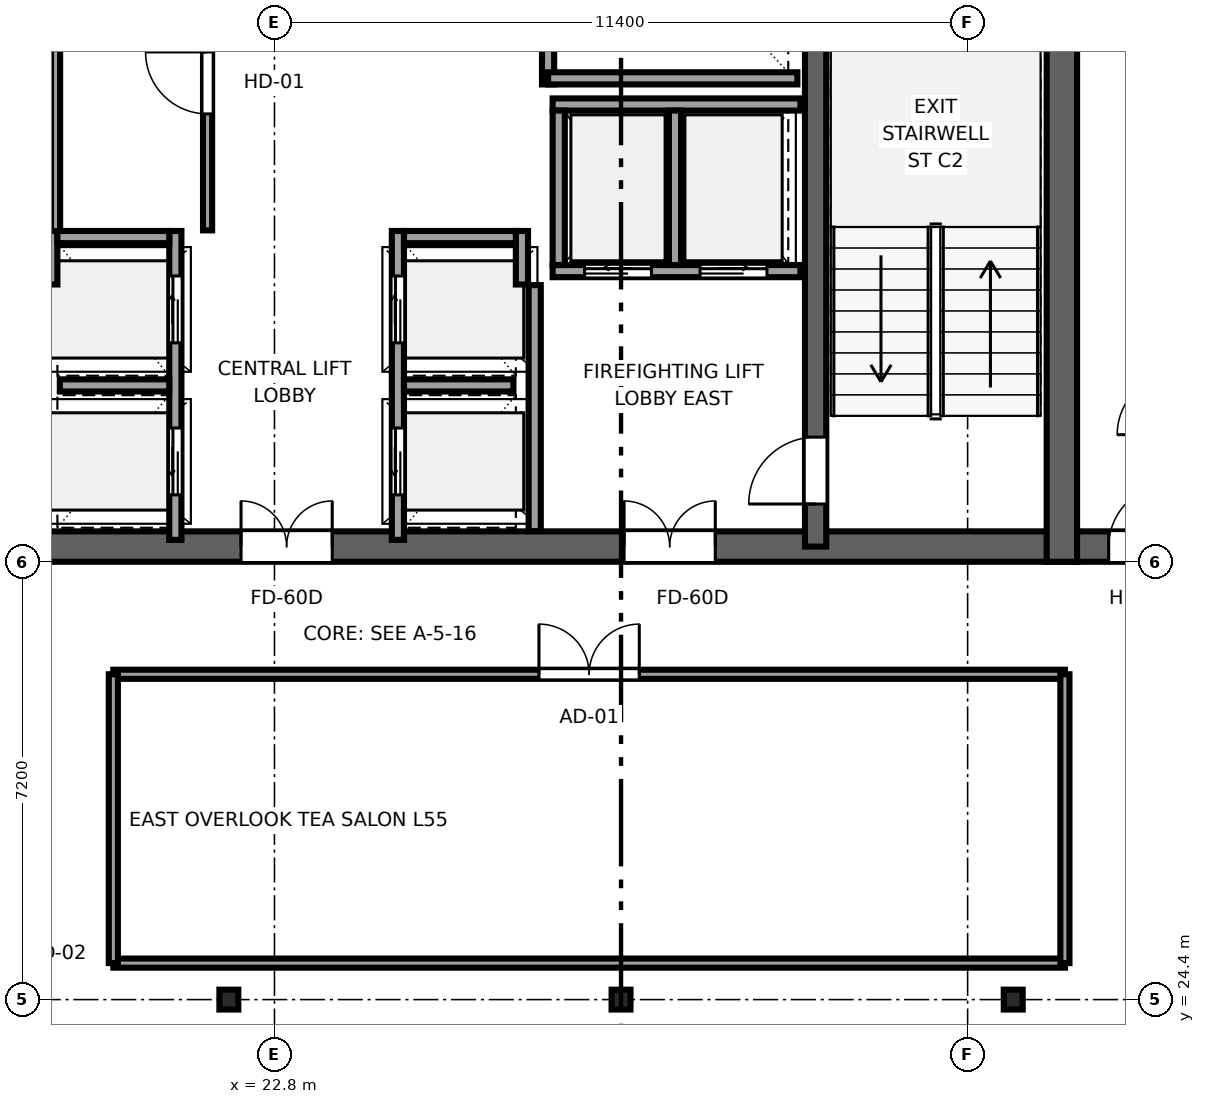
"""IFC4 building model, lengths in metres.
Left out: names, types, materials, properties, quantities, classifications, styles, units other than length and angle.
Written with IfcOpenShell. Run it as: python <this file> out.ifc"""

import sys

from ifc_helpers import new_model, si_unit, direction, frame, frame_2d, origin, origin_2d, place, context, subcontext, project, spatial, rectangle, i_section, extrude, source, transform, mapped, element, fill, save


model = new_model("IFC4")
c1 = context("Model", 3, precision=1e-05, world=origin(), true_north=direction((0.0, 1.0)))
c2 = subcontext(c1, "Body", "Model", "MODEL_VIEW")
j1 = project(units=[si_unit("LENGTHUNIT", "METRE"), si_unit("PLANEANGLEUNIT", "RADIAN")], contexts=[c1])
p1 = place(None, origin())
s1 = spatial("IfcSite", under=j1, at=p1, CompositionType="ELEMENT")
p2 = place(p1, origin())
s2 = spatial("IfcBuilding", under=s1, at=p2, CompositionType="ELEMENT")
p3 = place(p2, frame((0.0, 0.0, 209.7)))
s3 = spatial("IfcBuildingStorey", under=s2, at=p3, CompositionType="ELEMENT", Elevation=209.7)
p4 = place(p3, frame((10.0, 31.85, 0.0), z_axis=(0.0, 0.0, 1.0), x_axis=(1.0, 0.0, 0.0)))
e1 = element("IfcWall", 1, at=p4, inside=s3, PredefinedType="SHEAR", context=c2, shape_type="SweptSolid", body=[
    extrude(rectangle(XDim=26.0, YDim=0.5, at=frame_2d((13.0, 0.0))), origin(), (0.0, 0.0, 1.0), 3.55),
])
p5 = place(p4, frame((7.45, 0.0, 0.0), z_axis=(0.0, 0.0, 1.0), x_axis=(-1.0, 0.0, 0.0)))
e2 = element("IfcOpeningElement", 2, at=p5, cuts=e1, PredefinedType="OPENING", context=c2, shape_type="SweptSolid", body=[
    extrude(rectangle(XDim=1.5, YDim=2.04, at=frame_2d((0.75, 1.02))), frame((0.0, 0.26, 0.0), z_axis=(0.0, -1.0, 0.0), x_axis=(1.0, 0.0, 0.0)), (0.0, 0.0, 1.0), 0.52),
])
p6 = place(p4, frame((13.75, 0.0, 0.0), z_axis=(0.0, 0.0, 1.0), x_axis=(-1.0, 0.0, 0.0)))
e3 = element("IfcOpeningElement", 3, at=p6, cuts=e1, PredefinedType="OPENING", context=c2, shape_type="SweptSolid", body=[
    extrude(rectangle(XDim=1.5, YDim=2.04, at=frame_2d((0.75, 1.02))), frame((0.0, 0.26, 0.0), z_axis=(0.0, -1.0, 0.0), x_axis=(1.0, 0.0, 0.0)), (0.0, 0.0, 1.0), 0.52),
])
p7 = place(p4, frame((20.05, 0.0, 0.0), z_axis=(0.0, 0.0, 1.0), x_axis=(-1.0, 0.0, 0.0)))
e4 = element("IfcOpeningElement", 4, at=p7, cuts=e1, PredefinedType="OPENING", context=c2, shape_type="SweptSolid", body=[
    extrude(rectangle(XDim=1.5, YDim=2.04, at=frame_2d((0.75, 1.02))), frame((0.0, 0.26, 0.0), z_axis=(0.0, -1.0, 0.0), x_axis=(1.0, 0.0, 0.0)), (0.0, 0.0, 1.0), 0.52),
])
p8 = place(p3, frame((35.75, 31.6, 0.0), z_axis=(0.0, 0.0, 1.0), x_axis=(0.0, 1.0, 0.0)))
e5 = element("IfcWall", 5, at=p8, inside=s3, PredefinedType="SHEAR", context=c2, shape_type="SweptSolid", body=[
    extrude(rectangle(XDim=13.6, YDim=0.5, at=frame_2d((6.8, 0.0))), origin(), (0.0, 0.0, 1.0), 3.55),
])
p9 = place(p3, frame((31.7, 31.85, 0.0), z_axis=(0.0, 0.0, 1.0), x_axis=(0.0, 1.0, 0.0)))
e6 = element("IfcWall", 6, at=p9, inside=s3, PredefinedType="SHEAR", context=c2, shape_type="SweptSolid", body=[
    extrude(rectangle(XDim=13.1, YDim=0.35, at=frame_2d((6.55, 0.0))), origin(), (0.0, 0.0, 1.0), 3.55),
])
p10 = place(p9, frame((1.8, 0.0, 0.0), z_axis=(0.0, 0.0, 1.0), x_axis=(-1.0, 0.0, 0.0)))
e7 = element("IfcOpeningElement", 7, at=p10, cuts=e6, PredefinedType="OPENING", context=c2, shape_type="SweptSolid", body=[
    extrude(rectangle(XDim=1.1, YDim=2.12, at=frame_2d((0.55, 1.06))), frame((0.0, 0.185, 0.0), z_axis=(0.0, -1.0, 0.0), x_axis=(1.0, 0.0, 0.0)), (0.0, 0.0, 1.0), 0.37),
])
p11 = place(p3, frame((36.0, 31.85, 0.0), z_axis=(0.0, 0.0, 1.0), x_axis=(1.0, 0.0, 0.0)))
e8 = element("IfcWall", 8, at=p11, inside=s3, PredefinedType="SHEAR", context=c2, shape_type="SweptSolid", body=[
    extrude(rectangle(XDim=3.8, YDim=0.5, at=frame_2d((1.9, 0.0))), origin(), (0.0, 0.0, 1.0), 3.55),
])
p12 = place(p11, frame((1.54, 0.0, 0.0), z_axis=(0.0, 0.0, 1.0), x_axis=(-1.0, 0.0, 0.0)))
e9 = element("IfcOpeningElement", 9, at=p12, cuts=e8, PredefinedType="OPENING", context=c2, shape_type="SweptSolid", body=[
    extrude(rectangle(XDim=1.02, YDim=2.03, at=frame_2d((0.51, 1.015))), frame((0.0, 0.26, 0.0), z_axis=(0.0, -1.0, 0.0), x_axis=(1.0, 0.0, 0.0)), (0.0, 0.0, 1.0), 0.52),
])
m1 = source(origin(), c2, "Body", "SweptSolid", [
    extrude(i_section(OverallWidth=0.311, OverallDepth=0.327, WebThickness=0.016, FlangeThickness=0.025, FilletRadius=0.017, at=origin_2d()), origin(), (0.0, 0.0, 1.0), 3.55),
])
for number, where, z_axis, x_axis in (
    (10, (22.05, 24.4, 0.0), (0.0, 0.0, 1.0), (1.0, 0.0, 0.0)),
    (11, (28.5, 24.4, 0.0), (0.0, 0.0, 1.0), (1.0, 0.0, 0.0)),
    (12, (34.95, 24.4, 0.0), (0.0, 0.0, 1.0), (1.0, 0.0, 0.0)),
):
    element("IfcColumn", number, at=place(p3, frame(where, z_axis=z_axis, x_axis=x_axis)), inside=s3, PredefinedType="COLUMN", context=c2, shape_type="MappedRepresentation", body=[
        mapped(m1, transform((0.0, 0.0, 0.0), x_axis=(1.0, 0.0, 0.0), y_axis=(0.0, 1.0, 0.0), z_axis=(0.0, 0.0, 1.0), scale=1.0)),
    ])
p13 = place(p3, frame((27.3, 39.45, 0.0), z_axis=(0.0, 0.0, 1.0), x_axis=(0.0, 1.0, 0.0)))
e13 = element("IfcWall", 13, at=p13, inside=s3, PredefinedType="SOLIDWALL", context=c2, shape_type="SweptSolid", body=[
    extrude(rectangle(XDim=4.4, YDim=0.2, at=frame_2d((2.2, 0.0))), origin(), (0.0, 0.0, 1.0), 3.37),
])
p14 = place(p3, frame((27.3, 39.55, 0.0), z_axis=(0.0, 0.0, 1.0), x_axis=(1.0, 0.0, 0.0)))
e14 = element("IfcWall", 14, at=p14, inside=s3, PredefinedType="SOLIDWALL", context=c2, shape_type="SweptSolid", body=[
    extrude(rectangle(XDim=4.1, YDim=0.2, at=frame_2d((2.05, 0.0))), origin(), (0.0, 0.0, 1.0), 3.37),
])
p15 = place(p3, frame((27.08, 32.104, 0.0), z_axis=(0.0, 0.0, 1.0), x_axis=(0.0, 1.0, 0.0)))
e15 = element("IfcWall", 15, at=p15, inside=s3, PredefinedType="SOLIDWALL", context=c2, shape_type="SweptSolid", body=[
    extrude(rectangle(XDim=4.046, YDim=0.2, at=frame_2d((2.023, 0.0))), origin(), (0.0, 0.0, 1.0), 3.37),
])
p16 = place(p3, frame((21.17, 31.96, 0.0), z_axis=(0.0, 0.0, 1.0), x_axis=(0.0, 1.0, 0.0)))
e16 = element("IfcWall", 16, at=p16, inside=s3, PredefinedType="SOLIDWALL", context=c2, shape_type="SweptSolid", body=[
    extrude(rectangle(XDim=5.08, YDim=0.2, at=frame_2d((2.54, 0.0))), origin(), (0.0, 0.0, 1.0), 3.37),
])
p17 = place(p16, frame((0.74, 0.0, 0.0)))
e17 = element("IfcOpeningElement", 17, at=p17, cuts=e16, PredefinedType="OPENING", context=c2, shape_type="SweptSolid", body=[
    extrude(rectangle(XDim=1.1, YDim=2.12, at=frame_2d((0.55, 1.06))), frame((0.0, 0.11, 0.0), z_axis=(0.0, -1.0, 0.0), x_axis=(1.0, 0.0, 0.0)), (0.0, 0.0, 1.0), 0.22),
])
p18 = place(p16, frame((3.24, 0.0, 0.0)))
e18 = element("IfcOpeningElement", 18, at=p18, cuts=e16, PredefinedType="OPENING", context=c2, shape_type="SweptSolid", body=[
    extrude(rectangle(XDim=1.1, YDim=2.12, at=frame_2d((0.55, 1.06))), frame((0.0, 0.11, 0.0), z_axis=(0.0, -1.0, 0.0), x_axis=(1.0, 0.0, 0.0)), (0.0, 0.0, 1.0), 0.22),
])
p19 = place(p3, frame((19.13, 36.16, 0.0), z_axis=(0.0, 0.0, 1.0), x_axis=(0.0, 1.0, 0.0)))
e19 = element("IfcWall", 19, at=p19, inside=s3, PredefinedType="SOLIDWALL", context=c2, shape_type="SweptSolid", body=[
    extrude(rectangle(XDim=0.88, YDim=0.2, at=frame_2d((0.44, 0.0))), origin(), (0.0, 0.0, 1.0), 3.37),
])
p20 = place(p3, frame((19.23, 36.94, 0.0), z_axis=(0.0, 0.0, 1.0), x_axis=(1.0, 0.0, 0.0)))
e20 = element("IfcWall", 20, at=p20, inside=s3, PredefinedType="SOLIDWALL", context=c2, shape_type="SweptSolid", body=[
    extrude(rectangle(XDim=1.84, YDim=0.2, at=frame_2d((0.92, 0.0))), origin(), (0.0, 0.0, 1.0), 3.37),
])
p21 = place(p3, frame((19.27, 34.5, 0.0), z_axis=(0.0, 0.0, 1.0), x_axis=(1.0, 0.0, 0.0)))
e21 = element("IfcWall", 21, at=p21, inside=s3, PredefinedType="SOLIDWALL", context=c2, shape_type="SweptSolid", body=[
    extrude(rectangle(XDim=1.8, YDim=0.2, at=frame_2d((0.9, 0.0))), origin(), (0.0, 0.0, 1.0), 3.37),
])
p22 = place(p3, frame((27.375, 36.38, 0.0), z_axis=(0.0, 0.0, 1.0), x_axis=(1.0, 0.0, 0.0)))
e22 = element("IfcWall", 22, at=p22, inside=s3, PredefinedType="SOLIDWALL", context=c2, shape_type="SweptSolid", body=[
    extrude(rectangle(XDim=4.075, YDim=0.2, at=frame_2d((2.038, 0.0))), origin(), (0.0, 0.0, 1.0), 3.37),
])
p23 = place(p22, frame((0.525, 0.0, 0.0)))
e23 = element("IfcOpeningElement", 23, at=p23, cuts=e22, PredefinedType="OPENING", context=c2, shape_type="SweptSolid", body=[
    extrude(rectangle(XDim=1.1, YDim=2.12, at=frame_2d((0.55, 1.06))), frame((0.0, 0.11, 0.0), z_axis=(0.0, -1.0, 0.0), x_axis=(1.0, 0.0, 0.0)), (0.0, 0.0, 1.0), 0.22),
])
p24 = place(p22, frame((2.425, 0.0, 0.0)))
e24 = element("IfcOpeningElement", 24, at=p24, cuts=e22, PredefinedType="OPENING", context=c2, shape_type="SweptSolid", body=[
    extrude(rectangle(XDim=1.1, YDim=2.12, at=frame_2d((0.55, 1.06))), frame((0.0, 0.11, 0.0), z_axis=(0.0, -1.0, 0.0), x_axis=(1.0, 0.0, 0.0)), (0.0, 0.0, 1.0), 0.22),
])
p25 = place(p3, frame((27.375, 39.12, 0.0), z_axis=(0.0, 0.0, 1.0), x_axis=(1.0, 0.0, 0.0)))
e25 = element("IfcWall", 25, at=p25, inside=s3, PredefinedType="SOLIDWALL", context=c2, shape_type="SweptSolid", body=[
    extrude(rectangle(XDim=4.075, YDim=0.2, at=frame_2d((2.038, 0.0))), origin(), (0.0, 0.0, 1.0), 3.37),
])
for number, where, z_axis, x_axis in (
    (26, (27.475, 36.48, 0.0), (0.0, 0.0, 1.0), (0.0, 1.0, 0.0)),
    (27, (29.387, 36.48, 0.0), (0.0, 0.0, 1.0), (0.0, 1.0, 0.0)),
):
    element("IfcWall", number, at=place(p3, frame(where, z_axis=z_axis, x_axis=x_axis)), inside=s3, PredefinedType="SOLIDWALL", context=c2, shape_type="SweptSolid", body=[
        extrude(rectangle(XDim=2.54, YDim=0.2, at=frame_2d((1.27, 0.0))), origin(), (0.0, 0.0, 1.0), 3.37),
    ])
p26 = place(p3, frame((24.83, 31.96, 0.0), z_axis=(0.0, 0.0, 1.0), x_axis=(0.0, 1.0, 0.0)))
e28 = element("IfcWall", 28, at=p26, inside=s3, PredefinedType="SOLIDWALL", context=c2, shape_type="SweptSolid", body=[
    extrude(rectangle(XDim=5.08, YDim=0.2, at=frame_2d((2.54, 0.0))), origin(), (0.0, 0.0, 1.0), 3.37),
])
p27 = place(p26, frame((0.74, 0.0, 0.0)))
e29 = element("IfcOpeningElement", 29, at=p27, cuts=e28, PredefinedType="OPENING", context=c2, shape_type="SweptSolid", body=[
    extrude(rectangle(XDim=1.1, YDim=2.12, at=frame_2d((0.55, 1.06))), frame((0.0, 0.11, 0.0), z_axis=(0.0, -1.0, 0.0), x_axis=(1.0, 0.0, 0.0)), (0.0, 0.0, 1.0), 0.22),
])
p28 = place(p26, frame((3.24, 0.0, 0.0)))
e30 = element("IfcOpeningElement", 30, at=p28, cuts=e28, PredefinedType="OPENING", context=c2, shape_type="SweptSolid", body=[
    extrude(rectangle(XDim=1.1, YDim=2.12, at=frame_2d((0.55, 1.06))), frame((0.0, 0.11, 0.0), z_axis=(0.0, -1.0, 0.0), x_axis=(1.0, 0.0, 0.0)), (0.0, 0.0, 1.0), 0.22),
])
p29 = place(p3, frame((26.87, 36.16, 0.0), z_axis=(0.0, 0.0, 1.0), x_axis=(0.0, 1.0, 0.0)))
e31 = element("IfcWall", 31, at=p29, inside=s3, PredefinedType="SOLIDWALL", context=c2, shape_type="SweptSolid", body=[
    extrude(rectangle(XDim=0.88, YDim=0.2, at=frame_2d((0.44, 0.0))), origin(), (0.0, 0.0, 1.0), 3.37),
])
p30 = place(p3, frame((24.93, 36.94, 0.0), z_axis=(0.0, 0.0, 1.0), x_axis=(1.0, 0.0, 0.0)))
e32 = element("IfcWall", 32, at=p30, inside=s3, PredefinedType="SOLIDWALL", context=c2, shape_type="SweptSolid", body=[
    extrude(rectangle(XDim=1.84, YDim=0.2, at=frame_2d((0.92, 0.0))), origin(), (0.0, 0.0, 1.0), 3.37),
])
p31 = place(p3, frame((24.93, 34.5, 0.0), z_axis=(0.0, 0.0, 1.0), x_axis=(1.0, 0.0, 0.0)))
e33 = element("IfcWall", 33, at=p31, inside=s3, PredefinedType="SOLIDWALL", context=c2, shape_type="SweptSolid", body=[
    extrude(rectangle(XDim=1.8, YDim=0.2, at=frame_2d((0.9, 0.0))), origin(), (0.0, 0.0, 1.0), 3.37),
])
p32 = place(p3, frame((21.7, 37.05, 0.0), z_axis=(0.0, 0.0, 1.0), x_axis=(0.0, 1.0, 0.0)))
e34 = element("IfcWall", 34, at=p32, inside=s3, PredefinedType="PARTITIONING", context=c2, shape_type="SweptSolid", body=[
    extrude(rectangle(XDim=4.85, YDim=0.15, at=frame_2d((2.425, 0.0))), origin(), (0.0, 0.0, 1.0), 3.37),
])
p33 = place(p32, frame((1.915, 0.0, 0.0)))
e35 = element("IfcOpeningElement", 35, at=p33, cuts=e34, PredefinedType="OPENING", context=c2, shape_type="SweptSolid", body=[
    extrude(rectangle(XDim=1.02, YDim=2.03, at=frame_2d((0.51, 1.015))), frame((0.0, 0.085, 0.0), z_axis=(0.0, -1.0, 0.0), x_axis=(1.0, 0.0, 0.0)), (0.0, 0.0, 1.0), 0.17),
])
p34 = place(p3, frame((19.2, 37.04, 0.0), z_axis=(0.0, 0.0, 1.0), x_axis=(0.0, 1.0, 0.0)))
e36 = element("IfcWall", 36, at=p34, inside=s3, PredefinedType="PARTITIONING", context=c2, shape_type="SweptSolid", body=[
    extrude(rectangle(XDim=4.86, YDim=0.15, at=frame_2d((2.43, 0.0))), origin(), (0.0, 0.0, 1.0), 3.37),
])
p35 = place(p3, frame((20.15, 25.0, 0.0), z_axis=(0.0, 0.0, 1.0), x_axis=(1.0, 0.0, 0.0)))
e37 = element("IfcWall", 37, at=p35, inside=s3, PredefinedType="PARTITIONING", context=c2, shape_type="SweptSolid", body=[
    extrude(rectangle(XDim=15.65, YDim=0.15, at=frame_2d((7.825, 0.0))), origin(), (0.0, 0.0, 1.0), 3.37),
])
p36 = place(p3, frame((20.15, 29.75, 0.0), z_axis=(0.0, 0.0, 1.0), x_axis=(1.0, 0.0, 0.0)))
e38 = element("IfcWall", 38, at=p36, inside=s3, PredefinedType="PARTITIONING", context=c2, shape_type="SweptSolid", body=[
    extrude(rectangle(XDim=15.65, YDim=0.15, at=frame_2d((7.825, 0.0))), origin(), (0.0, 0.0, 1.0), 3.37),
])
p37 = place(p36, frame((7.0, 0.0, 0.0)))
e39 = element("IfcOpeningElement", 39, at=p37, cuts=e38, PredefinedType="OPENING", context=c2, shape_type="SweptSolid", body=[
    extrude(rectangle(XDim=1.65, YDim=2.15, at=frame_2d((0.825, 1.075))), frame((0.0, 0.085, 0.0), z_axis=(0.0, -1.0, 0.0), x_axis=(1.0, 0.0, 0.0)), (0.0, 0.0, 1.0), 0.17),
])
for number, where, z_axis, x_axis in (
    (40, (20.15, 25.0, 0.0), (0.0, 0.0, 1.0), (0.0, 1.0, 0.0)),
    (41, (35.8, 25.0, 0.0), (0.0, 0.0, 1.0), (0.0, 1.0, 0.0)),
):
    element("IfcWall", number, at=place(p3, frame(where, z_axis=z_axis, x_axis=x_axis)), inside=s3, PredefinedType="PARTITIONING", context=c2, shape_type="SweptSolid", body=[
        extrude(rectangle(XDim=4.75, YDim=0.15, at=frame_2d((2.375, 0.0))), origin(), (0.0, 0.0, 1.0), 3.37),
    ])
m2 = source(origin(), c2, "Body", "SweptSolid", [
    extrude(rectangle(XDim=1.1, YDim=2.12, at=frame_2d((0.55, 1.06))), frame((0.0, 0.025, 0.0), z_axis=(0.0, -1.0, 0.0), x_axis=(1.0, 0.0, 0.0)), (0.0, 0.0, 1.0), 0.05),
])
p38 = place(p10, origin())
e42 = element("IfcDoor", 42, at=p38, inside=s3, OperationType="SINGLE_SWING_LEFT", PredefinedType="DOOR", context=c2, shape_type="MappedRepresentation", body=[
    mapped(m2, transform((0.0, 0.0, 0.0), x_axis=(1.0, 0.0, 0.0), y_axis=(0.0, 1.0, 0.0), z_axis=(0.0, 0.0, 1.0), scale=1.0)),
])
fill(e7, e42)
m3 = source(origin(), c2, "Body", "SweptSolid", [
    extrude(rectangle(XDim=1.5, YDim=2.04, at=frame_2d((0.75, 1.02))), frame((0.0, 0.025, 0.0), z_axis=(0.0, -1.0, 0.0), x_axis=(1.0, 0.0, 0.0)), (0.0, 0.0, 1.0), 0.05),
])
p39 = place(p6, origin())
e43 = element("IfcDoor", 43, at=p39, inside=s3, OperationType="DOUBLE_DOOR_SINGLE_SWING", PredefinedType="DOOR", context=c2, shape_type="MappedRepresentation", body=[
    mapped(m3, transform((0.0, 0.0, 0.0), x_axis=(1.0, 0.0, 0.0), y_axis=(0.0, 1.0, 0.0), z_axis=(0.0, 0.0, 1.0), scale=1.0)),
])
fill(e3, e43)
p40 = place(p7, origin())
e44 = element("IfcDoor", 44, at=p40, inside=s3, OperationType="DOUBLE_DOOR_SINGLE_SWING", PredefinedType="DOOR", context=c2, shape_type="MappedRepresentation", body=[
    mapped(m3, transform((0.0, 0.0, 0.0), x_axis=(1.0, 0.0, 0.0), y_axis=(0.0, 1.0, 0.0), z_axis=(0.0, 0.0, 1.0), scale=1.0)),
])
fill(e4, e44)
m4 = source(origin(), c2, "Body", "SweptSolid", [
    extrude(rectangle(XDim=1.02, YDim=2.03, at=frame_2d((0.51, 1.015))), frame((0.0, 0.025, 0.0), z_axis=(0.0, -1.0, 0.0), x_axis=(1.0, 0.0, 0.0)), (0.0, 0.0, 1.0), 0.05),
])
p41 = place(p12, origin())
e45 = element("IfcDoor", 45, at=p41, inside=s3, OperationType="SINGLE_SWING_RIGHT", PredefinedType="DOOR", context=c2, shape_type="MappedRepresentation", body=[
    mapped(m4, transform((0.0, 0.0, 0.0), x_axis=(1.0, 0.0, 0.0), y_axis=(0.0, 1.0, 0.0), z_axis=(0.0, 0.0, 1.0), scale=1.0)),
])
fill(e9, e45)
m5 = source(origin(), c2, "Body", "SweptSolid", [
    extrude(rectangle(XDim=1.1, YDim=2.12, at=frame_2d((0.55, 1.06))), frame((0.0, 0.025, 0.0), z_axis=(0.0, -1.0, 0.0), x_axis=(1.0, 0.0, 0.0)), (0.0, 0.0, 1.0), 0.05),
])
p42 = place(p17, origin())
e46 = element("IfcDoor", 46, at=p42, inside=s3, OperationType="SLIDING_TO_LEFT", PredefinedType="DOOR", context=c2, shape_type="MappedRepresentation", body=[
    mapped(m5, transform((0.0, 0.0, 0.0), x_axis=(1.0, 0.0, 0.0), y_axis=(0.0, 1.0, 0.0), z_axis=(0.0, 0.0, 1.0), scale=1.0)),
])
fill(e17, e46)
p43 = place(p18, origin())
e47 = element("IfcDoor", 47, at=p43, inside=s3, OperationType="SLIDING_TO_RIGHT", PredefinedType="DOOR", context=c2, shape_type="MappedRepresentation", body=[
    mapped(m5, transform((0.0, 0.0, 0.0), x_axis=(1.0, 0.0, 0.0), y_axis=(0.0, 1.0, 0.0), z_axis=(0.0, 0.0, 1.0), scale=1.0)),
])
fill(e18, e47)
p44 = place(p23, origin())
e48 = element("IfcDoor", 48, at=p44, inside=s3, OperationType="SLIDING_TO_LEFT", PredefinedType="DOOR", context=c2, shape_type="MappedRepresentation", body=[
    mapped(m5, transform((0.0, 0.0, 0.0), x_axis=(1.0, 0.0, 0.0), y_axis=(0.0, 1.0, 0.0), z_axis=(0.0, 0.0, 1.0), scale=1.0)),
])
fill(e23, e48)
p45 = place(p24, origin())
e49 = element("IfcDoor", 49, at=p45, inside=s3, OperationType="SLIDING_TO_RIGHT", PredefinedType="DOOR", context=c2, shape_type="MappedRepresentation", body=[
    mapped(m5, transform((0.0, 0.0, 0.0), x_axis=(1.0, 0.0, 0.0), y_axis=(0.0, 1.0, 0.0), z_axis=(0.0, 0.0, 1.0), scale=1.0)),
])
fill(e24, e49)
p46 = place(p27, origin())
e50 = element("IfcDoor", 50, at=p46, inside=s3, OperationType="SLIDING_TO_LEFT", PredefinedType="DOOR", context=c2, shape_type="MappedRepresentation", body=[
    mapped(m5, transform((0.0, 0.0, 0.0), x_axis=(1.0, 0.0, 0.0), y_axis=(0.0, 1.0, 0.0), z_axis=(0.0, 0.0, 1.0), scale=1.0)),
])
fill(e29, e50)
p47 = place(p28, origin())
e51 = element("IfcDoor", 51, at=p47, inside=s3, OperationType="SLIDING_TO_RIGHT", PredefinedType="DOOR", context=c2, shape_type="MappedRepresentation", body=[
    mapped(m5, transform((0.0, 0.0, 0.0), x_axis=(1.0, 0.0, 0.0), y_axis=(0.0, 1.0, 0.0), z_axis=(0.0, 0.0, 1.0), scale=1.0)),
])
fill(e30, e51)
p48 = place(p33, origin())
e52 = element("IfcDoor", 52, at=p48, inside=s3, OperationType="SINGLE_SWING_RIGHT", PredefinedType="DOOR", context=c2, shape_type="MappedRepresentation", body=[
    mapped(m4, transform((0.0, 0.0, 0.0), x_axis=(1.0, 0.0, 0.0), y_axis=(0.0, 1.0, 0.0), z_axis=(0.0, 0.0, 1.0), scale=1.0)),
])
fill(e35, e52)
m6 = source(origin(), c2, "Body", "SweptSolid", [
    extrude(rectangle(XDim=1.65, YDim=2.15, at=frame_2d((0.825, 1.075))), frame((0.0, 0.025, 0.0), z_axis=(0.0, -1.0, 0.0), x_axis=(1.0, 0.0, 0.0)), (0.0, 0.0, 1.0), 0.05),
])
p49 = place(p37, origin())
e53 = element("IfcDoor", 53, at=p49, inside=s3, OperationType="DOUBLE_DOOR_SINGLE_SWING", PredefinedType="DOOR", context=c2, shape_type="MappedRepresentation", body=[
    mapped(m6, transform((0.0, 0.0, 0.0), x_axis=(1.0, 0.0, 0.0), y_axis=(0.0, 1.0, 0.0), z_axis=(0.0, 0.0, 1.0), scale=1.0)),
])
fill(e39, e53)
save(model, sys.argv[1])
